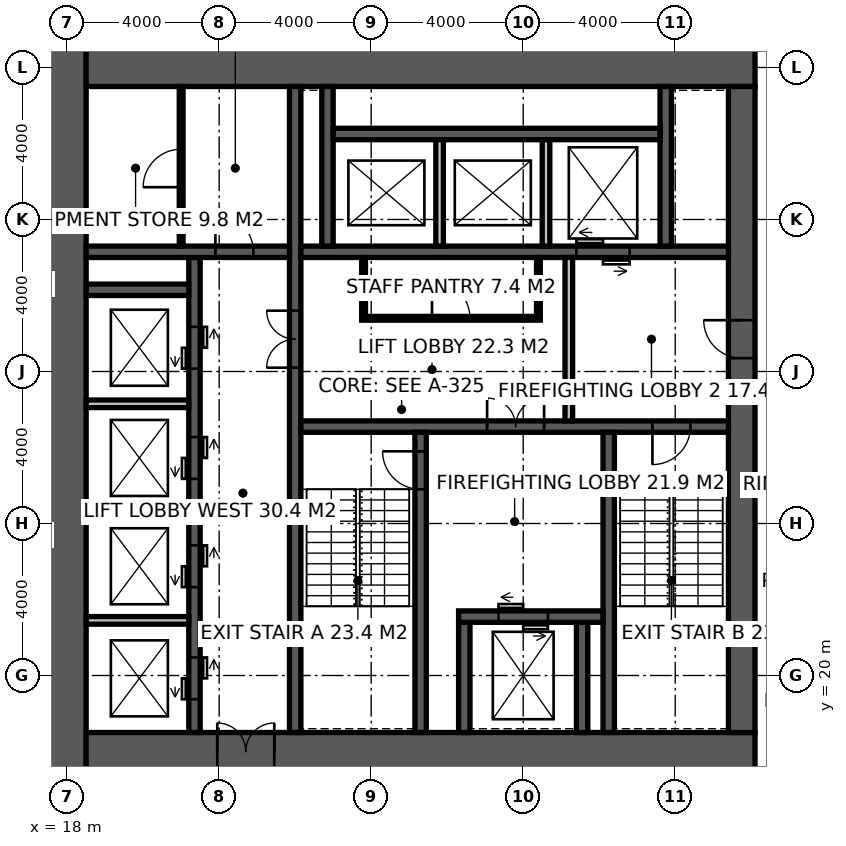
"""IFC4 building model, lengths in metres.
Left out: names, types, materials, properties, quantities, classifications, styles, units other than length and angle.
Written with IfcOpenShell. Run it as: python <this file> out.ifc"""

import sys

from ifc_helpers import new_model, si_unit, direction, frame, frame_2d, origin, place, context, subcontext, project, spatial, rectangle, extrude, element, fill, save


model = new_model("IFC4")
c1 = context("Model", 3, precision=1e-05, world=origin(), true_north=direction((0.0, 1.0)))
c2 = subcontext(c1, "Body", "Model", "MODEL_VIEW")
j1 = project(units=[si_unit("LENGTHUNIT", "METRE"), si_unit("PLANEANGLEUNIT", "RADIAN")], contexts=[c1])
p1 = place(None, origin())
s1 = spatial("IfcSite", under=j1, at=p1, CompositionType="ELEMENT")
p2 = place(p1, origin())
s2 = spatial("IfcBuilding", under=s1, at=p2, CompositionType="ELEMENT")
p3 = place(p2, frame((0.0, 0.0, 133.4)))
s3 = spatial("IfcBuildingStorey", under=s2, at=p3, CompositionType="ELEMENT", Elevation=133.4)
p4 = place(p3, frame((18.0, 17.5, -0.15), z_axis=(0.0, 0.0, 1.0), x_axis=(0.0, 1.0, 0.0)))
e1 = element("IfcWall", 1, at=p4, inside=s3, PredefinedType="SHEAR", context=c2, shape_type="SweptSolid", body=[
    extrude(rectangle(XDim=19.0, YDim=1.0, at=frame_2d((9.5, 0.0))), origin(), (0.0, 0.0, 1.0), 4.0),
])
p5 = place(p3, frame((18.5, 18.0, -0.15), z_axis=(0.0, 0.0, 1.0), x_axis=(1.0, 0.0, 0.0)))
e2 = element("IfcWall", 2, at=p5, inside=s3, PredefinedType="SHEAR", context=c2, shape_type="SweptSolid", body=[
    extrude(rectangle(XDim=17.6, YDim=1.0, at=frame_2d((8.8, 0.0))), origin(), (0.0, 0.0, 1.0), 4.0),
])
p6 = place(p5, frame((3.45, 0.0, 0.15)))
e3 = element("IfcOpeningElement", 3, at=p6, cuts=e2, PredefinedType="OPENING", context=c2, shape_type="SweptSolid", body=[
    extrude(rectangle(XDim=1.5, YDim=2.4, at=frame_2d((0.75, 1.2))), frame((0.0, 0.51, 0.0), z_axis=(0.0, -1.0, 0.0), x_axis=(1.0, 0.0, 0.0)), (0.0, 0.0, 1.0), 1.02),
])
p7 = place(p3, frame((18.5, 36.0, -0.15), z_axis=(0.0, 0.0, 1.0), x_axis=(1.0, 0.0, 0.0)))
e4 = element("IfcWall", 4, at=p7, inside=s3, PredefinedType="SHEAR", context=c2, shape_type="SweptSolid", body=[
    extrude(rectangle(XDim=17.6, YDim=1.0, at=frame_2d((8.8, 0.0))), origin(), (0.0, 0.0, 1.0), 4.0),
])
p8 = place(p3, frame((35.75, 18.5, -0.15), z_axis=(0.0, 0.0, 1.0), x_axis=(0.0, 1.0, 0.0)))
e5 = element("IfcWall", 5, at=p8, inside=s3, PredefinedType="SHEAR", context=c2, shape_type="SweptSolid", body=[
    extrude(rectangle(XDim=17.0, YDim=0.7, at=frame_2d((8.5, 0.0))), origin(), (0.0, 0.0, 1.0), 4.0),
])
p9 = place(p8, frame((9.85, 0.0, 0.15)))
e6 = element("IfcOpeningElement", 6, at=p9, cuts=e5, PredefinedType="OPENING", context=c2, shape_type="SweptSolid", body=[
    extrude(rectangle(XDim=1.0, YDim=2.2, at=frame_2d((0.5, 1.1))), frame((0.0, 0.36, 0.0), z_axis=(0.0, -1.0, 0.0), x_axis=(1.0, 0.0, 0.0)), (0.0, 0.0, 1.0), 0.72),
])
p10 = place(p3, frame((24.0, 18.5, -0.15), z_axis=(0.0, 0.0, 1.0), x_axis=(0.0, 1.0, 0.0)))
e7 = element("IfcWall", 7, at=p10, inside=s3, PredefinedType="SHEAR", context=c2, shape_type="SweptSolid", body=[
    extrude(rectangle(XDim=17.0, YDim=0.3, at=frame_2d((8.5, 0.0))), origin(), (0.0, 0.0, 1.0), 4.0),
])
p11 = place(p10, frame((9.6, 0.0, 0.15)))
e8 = element("IfcOpeningElement", 8, at=p11, cuts=e7, PredefinedType="OPENING", context=c2, shape_type="SweptSolid", body=[
    extrude(rectangle(XDim=1.5, YDim=2.4, at=frame_2d((0.75, 1.2))), frame((0.0, 0.16, 0.0), z_axis=(0.0, -1.0, 0.0), x_axis=(1.0, 0.0, 0.0)), (0.0, 0.0, 1.0), 0.32),
])
p12 = place(p3, frame((24.15, 26.55, -0.15), z_axis=(0.0, 0.0, 1.0), x_axis=(1.0, 0.0, 0.0)))
e9 = element("IfcWall", 9, at=p12, inside=s3, PredefinedType="SHEAR", context=c2, shape_type="SweptSolid", body=[
    extrude(rectangle(XDim=11.25, YDim=0.3, at=frame_2d((5.625, 0.0))), origin(), (0.0, 0.0, 1.0), 4.0),
])
p13 = place(p12, frame((9.25, 0.0, 0.15)))
e10 = element("IfcOpeningElement", 10, at=p13, cuts=e9, PredefinedType="OPENING", context=c2, shape_type="SweptSolid", body=[
    extrude(rectangle(XDim=1.0, YDim=2.2, at=frame_2d((0.5, 1.1))), frame((0.0, 0.16, 0.0), z_axis=(0.0, -1.0, 0.0), x_axis=(1.0, 0.0, 0.0)), (0.0, 0.0, 1.0), 0.32),
])
p14 = place(p12, frame((4.9, 0.0, 0.15)))
e11 = element("IfcOpeningElement", 11, at=p14, cuts=e9, PredefinedType="OPENING", context=c2, shape_type="SweptSolid", body=[
    extrude(rectangle(XDim=1.5, YDim=2.4, at=frame_2d((0.75, 1.2))), frame((0.0, 0.16, 0.0), z_axis=(0.0, -1.0, 0.0), x_axis=(1.0, 0.0, 0.0)), (0.0, 0.0, 1.0), 0.32),
])
p15 = place(p3, frame((27.3, 18.5, -0.15), z_axis=(0.0, 0.0, 1.0), x_axis=(0.0, 1.0, 0.0)))
e12 = element("IfcWall", 12, at=p15, inside=s3, PredefinedType="SHEAR", context=c2, shape_type="SweptSolid", body=[
    extrude(rectangle(XDim=7.9, YDim=0.3, at=frame_2d((3.95, 0.0))), origin(), (0.0, 0.0, 1.0), 4.0),
])
p16 = place(p15, frame((6.4, 0.0, 0.15)))
e13 = element("IfcOpeningElement", 13, at=p16, cuts=e12, PredefinedType="OPENING", context=c2, shape_type="SweptSolid", body=[
    extrude(rectangle(XDim=1.0, YDim=2.2, at=frame_2d((0.5, 1.1))), frame((0.0, 0.16, 0.0), z_axis=(0.0, -1.0, 0.0), x_axis=(1.0, 0.0, 0.0)), (0.0, 0.0, 1.0), 0.32),
])
p17 = place(p3, frame((32.25, 18.5, -0.15), z_axis=(0.0, 0.0, 1.0), x_axis=(0.0, 1.0, 0.0)))
e14 = element("IfcWall", 14, at=p17, inside=s3, PredefinedType="SHEAR", context=c2, shape_type="SweptSolid", body=[
    extrude(rectangle(XDim=7.9, YDim=0.3, at=frame_2d((3.95, 0.0))), origin(), (0.0, 0.0, 1.0), 4.0),
])
for number, where, z_axis, x_axis in (
    (15, (28.45, 18.5, -0.15), (0.0, 0.0, 1.0), (0.0, 1.0, 0.0)),
    (16, (31.55, 18.5, -0.15), (0.0, 0.0, 1.0), (0.0, 1.0, 0.0)),
):
    element("IfcWall", number, at=place(p3, frame(where, z_axis=z_axis, x_axis=x_axis)), inside=s3, PredefinedType="SHEAR", context=c2, shape_type="SweptSolid", body=[
        extrude(rectangle(XDim=2.9, YDim=0.3, at=frame_2d((1.45, 0.0))), origin(), (0.0, 0.0, 1.0), 4.0),
    ])
p18 = place(p3, frame((28.3, 21.55, -0.15), z_axis=(0.0, 0.0, 1.0), x_axis=(1.0, 0.0, 0.0)))
e17 = element("IfcWall", 17, at=p18, inside=s3, PredefinedType="SHEAR", context=c2, shape_type="SweptSolid", body=[
    extrude(rectangle(XDim=3.8, YDim=0.3, at=frame_2d((1.9, 0.0))), origin(), (0.0, 0.0, 1.0), 4.0),
])
p19 = place(p18, frame((1.05, 0.0, 0.15)))
e18 = element("IfcOpeningElement", 18, at=p19, cuts=e17, PredefinedType="OPENING", context=c2, shape_type="SweptSolid", body=[
    extrude(rectangle(XDim=1.3, YDim=2.4, at=frame_2d((0.65, 1.2))), frame((0.0, 0.16, 0.0), z_axis=(0.0, -1.0, 0.0), x_axis=(1.0, 0.0, 0.0)), (0.0, 0.0, 1.0), 0.32),
])
p20 = place(p3, frame((24.15, 31.15, -0.15), z_axis=(0.0, 0.0, 1.0), x_axis=(1.0, 0.0, 0.0)))
e19 = element("IfcWall", 19, at=p20, inside=s3, PredefinedType="SHEAR", context=c2, shape_type="SweptSolid", body=[
    extrude(rectangle(XDim=11.25, YDim=0.3, at=frame_2d((5.625, 0.0))), origin(), (0.0, 0.0, 1.0), 4.0),
])
p21 = place(p20, frame((7.25, 0.0, 0.15)))
e20 = element("IfcOpeningElement", 20, at=p21, cuts=e19, PredefinedType="OPENING", context=c2, shape_type="SweptSolid", body=[
    extrude(rectangle(XDim=1.4, YDim=2.4, at=frame_2d((0.7, 1.2))), frame((0.0, 0.16, 0.0), z_axis=(0.0, -1.0, 0.0), x_axis=(1.0, 0.0, 0.0)), (0.0, 0.0, 1.0), 0.32),
])
p22 = place(p3, frame((21.35, 18.5, -0.15), z_axis=(0.0, 0.0, 1.0), x_axis=(0.0, 1.0, 0.0)))
e21 = element("IfcWall", 21, at=p22, inside=s3, PredefinedType="SHEAR", context=c2, shape_type="SweptSolid", body=[
    extrude(rectangle(XDim=12.5, YDim=0.3, at=frame_2d((6.25, 0.0))), origin(), (0.0, 0.0, 1.0), 4.0),
])
p23 = place(p22, frame((0.875, 0.0, 0.15)))
e22 = element("IfcOpeningElement", 22, at=p23, cuts=e21, PredefinedType="OPENING", context=c2, shape_type="SweptSolid", body=[
    extrude(rectangle(XDim=1.1, YDim=2.2, at=frame_2d((0.55, 1.1))), frame((0.0, 0.16, 0.0), z_axis=(0.0, -1.0, 0.0), x_axis=(1.0, 0.0, 0.0)), (0.0, 0.0, 1.0), 0.32),
])
p24 = place(p22, frame((3.825, 0.0, 0.15)))
e23 = element("IfcOpeningElement", 23, at=p24, cuts=e21, PredefinedType="OPENING", context=c2, shape_type="SweptSolid", body=[
    extrude(rectangle(XDim=1.1, YDim=2.2, at=frame_2d((0.55, 1.1))), frame((0.0, 0.16, 0.0), z_axis=(0.0, -1.0, 0.0), x_axis=(1.0, 0.0, 0.0)), (0.0, 0.0, 1.0), 0.32),
])
p25 = place(p22, frame((6.675, 0.0, 0.15)))
e24 = element("IfcOpeningElement", 24, at=p25, cuts=e21, PredefinedType="OPENING", context=c2, shape_type="SweptSolid", body=[
    extrude(rectangle(XDim=1.1, YDim=2.2, at=frame_2d((0.55, 1.1))), frame((0.0, 0.16, 0.0), z_axis=(0.0, -1.0, 0.0), x_axis=(1.0, 0.0, 0.0)), (0.0, 0.0, 1.0), 0.32),
])
p26 = place(p22, frame((9.575, 0.0, 0.15)))
e25 = element("IfcOpeningElement", 25, at=p26, cuts=e21, PredefinedType="OPENING", context=c2, shape_type="SweptSolid", body=[
    extrude(rectangle(XDim=1.1, YDim=2.2, at=frame_2d((0.55, 1.1))), frame((0.0, 0.16, 0.0), z_axis=(0.0, -1.0, 0.0), x_axis=(1.0, 0.0, 0.0)), (0.0, 0.0, 1.0), 0.32),
])
p27 = place(p3, frame((18.5, 31.15, -0.15), z_axis=(0.0, 0.0, 1.0), x_axis=(1.0, 0.0, 0.0)))
e26 = element("IfcWall", 26, at=p27, inside=s3, PredefinedType="SHEAR", context=c2, shape_type="SweptSolid", body=[
    extrude(rectangle(XDim=5.35, YDim=0.3, at=frame_2d((2.675, 0.0))), origin(), (0.0, 0.0, 1.0), 4.0),
])
p28 = place(p27, frame((3.4, 0.0, 0.15)))
e27 = element("IfcOpeningElement", 27, at=p28, cuts=e26, PredefinedType="OPENING", context=c2, shape_type="SweptSolid", body=[
    extrude(rectangle(XDim=1.0, YDim=2.2, at=frame_2d((0.5, 1.1))), frame((0.0, 0.16, 0.0), z_axis=(0.0, -1.0, 0.0), x_axis=(1.0, 0.0, 0.0)), (0.0, 0.0, 1.0), 0.32),
])
p29 = place(p3, frame((18.5, 30.15, -0.15), z_axis=(0.0, 0.0, 1.0), x_axis=(1.0, 0.0, 0.0)))
e28 = element("IfcWall", 28, at=p29, inside=s3, PredefinedType="SHEAR", context=c2, shape_type="SweptSolid", body=[
    extrude(rectangle(XDim=2.7, YDim=0.3, at=frame_2d((1.35, 0.0))), origin(), (0.0, 0.0, 1.0), 4.0),
])
for number, where, z_axis, x_axis in (
    (29, (24.85, 31.3, -0.15), (0.0, 0.0, 1.0), (0.0, 1.0, 0.0)),
    (30, (33.75, 31.3, -0.15), (0.0, 0.0, 1.0), (0.0, 1.0, 0.0)),
):
    element("IfcWall", number, at=place(p3, frame(where, z_axis=z_axis, x_axis=x_axis)), inside=s3, PredefinedType="SHEAR", context=c2, shape_type="SweptSolid", body=[
        extrude(rectangle(XDim=4.2, YDim=0.3, at=frame_2d((2.1, 0.0))), origin(), (0.0, 0.0, 1.0), 4.0),
    ])
p30 = place(p3, frame((25.0, 34.25, -0.15), z_axis=(0.0, 0.0, 1.0), x_axis=(1.0, 0.0, 0.0)))
e31 = element("IfcWall", 31, at=p30, inside=s3, PredefinedType="SHEAR", context=c2, shape_type="SweptSolid", body=[
    extrude(rectangle(XDim=8.6, YDim=0.3, at=frame_2d((4.3, 0.0))), origin(), (0.0, 0.0, 1.0), 4.0),
])
for number, where, z_axis, x_axis in (
    (32, (27.8, 31.3, -0.15), (0.0, 0.0, 1.0), (0.0, 1.0, 0.0)),
    (33, (30.6, 31.3, -0.15), (0.0, 0.0, 1.0), (0.0, 1.0, 0.0)),
):
    element("IfcWall", number, at=place(p3, frame(where, z_axis=z_axis, x_axis=x_axis)), inside=s3, PredefinedType="SOLIDWALL", context=c2, shape_type="SweptSolid", body=[
        extrude(rectangle(XDim=2.8, YDim=0.2, at=frame_2d((1.4, 0.0))), origin(), (0.0, 0.0, 1.0), 4.0),
    ])
for number, where, z_axis, x_axis in (
    (34, (18.5, 21.45, -0.15), (0.0, 0.0, 1.0), (1.0, 0.0, 0.0)),
    (35, (18.5, 24.3, -0.15), (0.0, 0.0, 1.0), (1.0, 0.0, 0.0)),
    (36, (18.5, 27.15, -0.15), (0.0, 0.0, 1.0), (1.0, 0.0, 0.0)),
):
    element("IfcWall", number, at=place(p3, frame(where, z_axis=z_axis, x_axis=x_axis)), inside=s3, PredefinedType="SOLIDWALL", context=c2, shape_type="SweptSolid", body=[
        extrude(rectangle(XDim=2.7, YDim=0.2, at=frame_2d((1.35, 0.0))), origin(), (0.0, 0.0, 1.0), 4.0),
    ])
p31 = place(p3, frame((31.2, 26.7, 0.0), z_axis=(0.0, 0.0, 1.0), x_axis=(0.0, 1.0, 0.0)))
e37 = element("IfcWall", 37, at=p31, inside=s3, PredefinedType="SOLIDWALL", context=c2, shape_type="SweptSolid", body=[
    extrude(rectangle(XDim=4.3, YDim=0.2, at=frame_2d((2.15, 0.0))), origin(), (0.0, 0.0, 1.0), 3.85),
])
p32 = place(p3, frame((21.0, 31.3, 0.0), z_axis=(0.0, 0.0, 1.0), x_axis=(0.0, 1.0, 0.0)))
e38 = element("IfcWall", 38, at=p32, inside=s3, PredefinedType="PARTITIONING", context=c2, shape_type="SweptSolid", body=[
    extrude(rectangle(XDim=4.2, YDim=0.1, at=frame_2d((2.1, 0.0))), origin(), (0.0, 0.0, 1.0), 3.85),
])
p33 = place(p32, frame((1.55, 0.0, 0.0)))
e39 = element("IfcOpeningElement", 39, at=p33, cuts=e38, PredefinedType="OPENING", context=c2, shape_type="SweptSolid", body=[
    extrude(rectangle(XDim=1.0, YDim=2.2, at=frame_2d((0.5, 1.1))), frame((0.0, 0.06, 0.0), z_axis=(0.0, -1.0, 0.0), x_axis=(1.0, 0.0, 0.0)), (0.0, 0.0, 1.0), 0.12),
])
p34 = place(p3, frame((25.75, 29.4, 0.0), z_axis=(0.0, 0.0, 1.0), x_axis=(1.0, 0.0, 0.0)))
e40 = element("IfcWall", 40, at=p34, inside=s3, PredefinedType="PARTITIONING", context=c2, shape_type="SweptSolid", body=[
    extrude(rectangle(XDim=4.7, YDim=0.1, at=frame_2d((2.35, 0.0))), origin(), (0.0, 0.0, 1.0), 3.85),
])
p35 = place(p34, frame((1.85, 0.0, 0.0)))
e41 = element("IfcOpeningElement", 41, at=p35, cuts=e40, PredefinedType="OPENING", context=c2, shape_type="SweptSolid", body=[
    extrude(rectangle(XDim=1.0, YDim=2.2, at=frame_2d((0.5, 1.1))), frame((0.0, 0.06, 0.0), z_axis=(0.0, -1.0, 0.0), x_axis=(1.0, 0.0, 0.0)), (0.0, 0.0, 1.0), 0.12),
])
for number, where, z_axis, x_axis in (
    (42, (25.8, 29.45, 0.0), (0.0, 0.0, 1.0), (0.0, 1.0, 0.0)),
    (43, (30.4, 29.45, 0.0), (0.0, 0.0, 1.0), (0.0, 1.0, 0.0)),
):
    element("IfcWall", number, at=place(p3, frame(where, z_axis=z_axis, x_axis=x_axis)), inside=s3, PredefinedType="PARTITIONING", context=c2, shape_type="SweptSolid", body=[
        extrude(rectangle(XDim=1.55, YDim=0.1, at=frame_2d((0.775, 0.0))), origin(), (0.0, 0.0, 1.0), 3.85),
    ])
p36 = place(p16, origin())
e44 = element("IfcDoor", 44, at=p36, inside=s3, OperationType="SINGLE_SWING_RIGHT", PredefinedType="DOOR", context=c2, shape_type="SweptSolid", body=[
    extrude(rectangle(XDim=1.0, YDim=2.2, at=frame_2d((0.5, 1.1))), frame((0.0, 0.025, 0.0), z_axis=(0.0, -1.0, 0.0), x_axis=(1.0, 0.0, 0.0)), (0.0, 0.0, 1.0), 0.05),
])
fill(e13, e44)
p37 = place(p13, frame((1.0, 0.0, 0.0), z_axis=(0.0, 0.0, 1.0), x_axis=(-1.0, 0.0, 0.0)))
e45 = element("IfcDoor", 45, at=p37, inside=s3, OperationType="SINGLE_SWING_RIGHT", PredefinedType="DOOR", context=c2, shape_type="SweptSolid", body=[
    extrude(rectangle(XDim=1.0, YDim=2.2, at=frame_2d((0.5, 1.1))), frame((0.0, 0.025, 0.0), z_axis=(0.0, -1.0, 0.0), x_axis=(1.0, 0.0, 0.0)), (0.0, 0.0, 1.0), 0.05),
])
fill(e10, e45)
p38 = place(p9, origin())
e46 = element("IfcDoor", 46, at=p38, inside=s3, OperationType="SINGLE_SWING_RIGHT", PredefinedType="DOOR", context=c2, shape_type="SweptSolid", body=[
    extrude(rectangle(XDim=1.0, YDim=2.2, at=frame_2d((0.5, 1.1))), frame((0.0, 0.025, 0.0), z_axis=(0.0, -1.0, 0.0), x_axis=(1.0, 0.0, 0.0)), (0.0, 0.0, 1.0), 0.05),
])
fill(e6, e46)
p39 = place(p14, origin())
e47 = element("IfcDoor", 47, at=p39, inside=s3, OperationType="DOUBLE_DOOR_DOUBLE_SWING", PredefinedType="DOOR", context=c2, shape_type="SweptSolid", body=[
    extrude(rectangle(XDim=1.5, YDim=2.4, at=frame_2d((0.75, 1.2))), frame((0.0, 0.025, 0.0), z_axis=(0.0, -1.0, 0.0), x_axis=(1.0, 0.0, 0.0)), (0.0, 0.0, 1.0), 0.05),
])
fill(e11, e47)
p40 = place(p11, origin())
e48 = element("IfcDoor", 48, at=p40, inside=s3, OperationType="DOUBLE_DOOR_DOUBLE_SWING", PredefinedType="DOOR", context=c2, shape_type="SweptSolid", body=[
    extrude(rectangle(XDim=1.5, YDim=2.4, at=frame_2d((0.75, 1.2))), frame((0.0, 0.025, 0.0), z_axis=(0.0, -1.0, 0.0), x_axis=(1.0, 0.0, 0.0)), (0.0, 0.0, 1.0), 0.05),
])
fill(e8, e48)
p41 = place(p28, origin())
e49 = element("IfcDoor", 49, at=p41, inside=s3, OperationType="SINGLE_SWING_LEFT", PredefinedType="DOOR", context=c2, shape_type="SweptSolid", body=[
    extrude(rectangle(XDim=1.0, YDim=2.2, at=frame_2d((0.5, 1.1))), frame((0.0, 0.025, 0.0), z_axis=(0.0, -1.0, 0.0), x_axis=(1.0, 0.0, 0.0)), (0.0, 0.0, 1.0), 0.05),
])
fill(e27, e49)
p42 = place(p33, origin())
e50 = element("IfcDoor", 50, at=p42, inside=s3, OperationType="SINGLE_SWING_LEFT", PredefinedType="DOOR", context=c2, shape_type="SweptSolid", body=[
    extrude(rectangle(XDim=1.0, YDim=2.2, at=frame_2d((0.5, 1.1))), frame((0.0, 0.025, 0.0), z_axis=(0.0, -1.0, 0.0), x_axis=(1.0, 0.0, 0.0)), (0.0, 0.0, 1.0), 0.05),
])
fill(e39, e50)
p43 = place(p35, origin())
e51 = element("IfcDoor", 51, at=p43, inside=s3, OperationType="SINGLE_SWING_LEFT", PredefinedType="DOOR", context=c2, shape_type="SweptSolid", body=[
    extrude(rectangle(XDim=1.0, YDim=2.2, at=frame_2d((0.5, 1.1))), frame((0.0, 0.025, 0.0), z_axis=(0.0, -1.0, 0.0), x_axis=(1.0, 0.0, 0.0)), (0.0, 0.0, 1.0), 0.05),
])
fill(e41, e51)
p44 = place(p6, origin())
e52 = element("IfcDoor", 52, at=p44, inside=s3, OperationType="DOUBLE_DOOR_DOUBLE_SWING", PredefinedType="DOOR", context=c2, shape_type="SweptSolid", body=[
    extrude(rectangle(XDim=1.5, YDim=2.4, at=frame_2d((0.75, 1.2))), frame((0.0, 0.025, 0.0), z_axis=(0.0, -1.0, 0.0), x_axis=(1.0, 0.0, 0.0)), (0.0, 0.0, 1.0), 0.05),
])
fill(e3, e52)
p45 = place(p19, origin())
e53 = element("IfcDoor", 53, at=p45, inside=s3, OperationType="DOUBLE_DOOR_SLIDING", PredefinedType="DOOR", context=c2, shape_type="SweptSolid", body=[
    extrude(rectangle(XDim=1.3, YDim=2.4, at=frame_2d((0.65, 1.2))), frame((0.0, 0.025, 0.0), z_axis=(0.0, -1.0, 0.0), x_axis=(1.0, 0.0, 0.0)), (0.0, 0.0, 1.0), 0.05),
])
fill(e18, e53)
p46 = place(p21, origin())
e54 = element("IfcDoor", 54, at=p46, inside=s3, OperationType="DOUBLE_DOOR_SLIDING", PredefinedType="DOOR", context=c2, shape_type="SweptSolid", body=[
    extrude(rectangle(XDim=1.4, YDim=2.4, at=frame_2d((0.7, 1.2))), frame((0.0, 0.025, 0.0), z_axis=(0.0, -1.0, 0.0), x_axis=(1.0, 0.0, 0.0)), (0.0, 0.0, 1.0), 0.05),
])
fill(e20, e54)
p47 = place(p23, origin())
e55 = element("IfcDoor", 55, at=p47, inside=s3, OperationType="DOUBLE_DOOR_SLIDING", PredefinedType="DOOR", context=c2, shape_type="SweptSolid", body=[
    extrude(rectangle(XDim=1.1, YDim=2.2, at=frame_2d((0.55, 1.1))), frame((0.0, 0.025, 0.0), z_axis=(0.0, -1.0, 0.0), x_axis=(1.0, 0.0, 0.0)), (0.0, 0.0, 1.0), 0.05),
])
fill(e22, e55)
p48 = place(p24, origin())
e56 = element("IfcDoor", 56, at=p48, inside=s3, OperationType="DOUBLE_DOOR_SLIDING", PredefinedType="DOOR", context=c2, shape_type="SweptSolid", body=[
    extrude(rectangle(XDim=1.1, YDim=2.2, at=frame_2d((0.55, 1.1))), frame((0.0, 0.025, 0.0), z_axis=(0.0, -1.0, 0.0), x_axis=(1.0, 0.0, 0.0)), (0.0, 0.0, 1.0), 0.05),
])
fill(e23, e56)
p49 = place(p25, origin())
e57 = element("IfcDoor", 57, at=p49, inside=s3, OperationType="DOUBLE_DOOR_SLIDING", PredefinedType="DOOR", context=c2, shape_type="SweptSolid", body=[
    extrude(rectangle(XDim=1.1, YDim=2.2, at=frame_2d((0.55, 1.1))), frame((0.0, 0.025, 0.0), z_axis=(0.0, -1.0, 0.0), x_axis=(1.0, 0.0, 0.0)), (0.0, 0.0, 1.0), 0.05),
])
fill(e24, e57)
p50 = place(p26, origin())
e58 = element("IfcDoor", 58, at=p50, inside=s3, OperationType="DOUBLE_DOOR_SLIDING", PredefinedType="DOOR", context=c2, shape_type="SweptSolid", body=[
    extrude(rectangle(XDim=1.1, YDim=2.2, at=frame_2d((0.55, 1.1))), frame((0.0, 0.025, 0.0), z_axis=(0.0, -1.0, 0.0), x_axis=(1.0, 0.0, 0.0)), (0.0, 0.0, 1.0), 0.05),
])
fill(e25, e58)
save(model, sys.argv[1])
